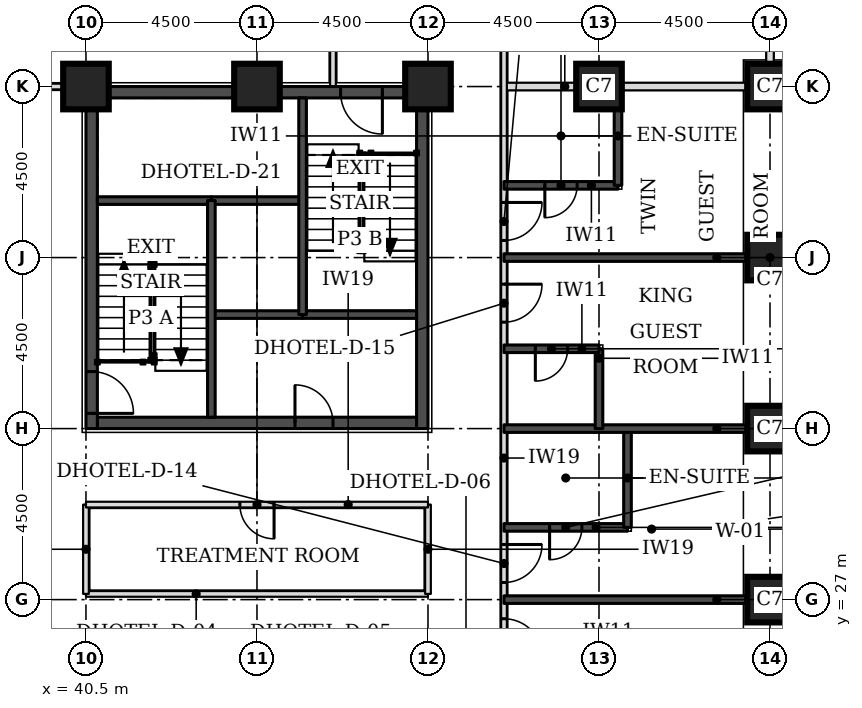
"""IFC4 building model, lengths in metres.
Left out: names, types, materials, properties, quantities, classifications, styles, units other than length and angle.
Written with IfcOpenShell. Run it as: python <this file> out.ifc"""

import sys

from ifc_helpers import new_model, si_unit, direction, frame, frame_2d, origin, origin_2d, place, context, subcontext, project, spatial, rectangle, extrude, element, fill, save


model = new_model("IFC4")
c1 = context("Model", 3, precision=1e-05, world=origin(), true_north=direction((0.0, 1.0)))
c2 = subcontext(c1, "Body", "Model", "MODEL_VIEW")
j1 = project(units=[si_unit("LENGTHUNIT", "METRE"), si_unit("PLANEANGLEUNIT", "RADIAN")], contexts=[c1])
p1 = place(None, origin())
s1 = spatial("IfcSite", under=j1, at=p1, CompositionType="ELEMENT")
p2 = place(p1, origin())
s2 = spatial("IfcBuilding", under=s1, at=p2, CompositionType="ELEMENT")
p3 = place(p2, frame((0.0, 0.0, 36.3)))
s3 = spatial("IfcBuildingStorey", under=s2, at=p3, CompositionType="ELEMENT", Elevation=36.3)
for number, where, z_axis, x_axis in (
    (1, (58.5, 27.0, 0.0), (0.0, 0.0, 1.0), (1.0, 0.0, 0.0)),
    (2, (58.5, 31.5, 0.0), (0.0, 0.0, 1.0), (1.0, 0.0, 0.0)),
    (3, (58.5, 36.0, 0.0), (0.0, 0.0, 1.0), (1.0, 0.0, 0.0)),
    (4, (40.5, 40.5, 0.0), (0.0, 0.0, 1.0), (1.0, 0.0, 0.0)),
    (5, (45.0, 40.5, 0.0), (0.0, 0.0, 1.0), (1.0, 0.0, 0.0)),
    (6, (49.5, 40.5, 0.0), (0.0, 0.0, 1.0), (1.0, 0.0, 0.0)),
    (7, (54.0, 40.5, 0.0), (0.0, 0.0, 1.0), (1.0, 0.0, 0.0)),
    (8, (58.5, 40.5, 0.0), (0.0, 0.0, 1.0), (1.0, 0.0, 0.0)),
):
    element("IfcColumn", number, at=place(p3, frame(where, z_axis=z_axis, x_axis=x_axis)), inside=s3, PredefinedType="COLUMN", context=c2, shape_type="SweptSolid", body=[
        extrude(rectangle(XDim=1.2, YDim=1.2, at=origin_2d()), origin(), (0.0, 0.0, 1.0), 3.3),
    ])
p4 = place(p3, frame((40.8, 31.65, 0.0), z_axis=(0.0, 0.0, 1.0), x_axis=(1.0, 0.0, 0.0)))
e9 = element("IfcWall", 9, at=p4, inside=s3, PredefinedType="SHEAR", context=c2, shape_type="SweptSolid", body=[
    extrude(rectangle(XDim=8.4, YDim=0.3, at=frame_2d((4.2, 0.0))), origin(), (0.0, 0.0, 1.0), 3.3),
])
p5 = place(p4, frame((5.2, 0.0, 0.0)))
e10 = element("IfcOpeningElement", 10, at=p5, cuts=e9, PredefinedType="OPENING", context=c2, shape_type="SweptSolid", body=[
    extrude(rectangle(XDim=1.0, YDim=2.1, at=frame_2d((0.5, 1.05))), frame((0.0, 0.16, 0.0), z_axis=(0.0, -1.0, 0.0), x_axis=(1.0, 0.0, 0.0)), (0.0, 0.0, 1.0), 0.32),
])
p6 = place(p3, frame((40.8, 40.35, 0.0), z_axis=(0.0, 0.0, 1.0), x_axis=(1.0, 0.0, 0.0)))
e11 = element("IfcWall", 11, at=p6, inside=s3, PredefinedType="SHEAR", context=c2, shape_type="SweptSolid", body=[
    extrude(rectangle(XDim=8.4, YDim=0.3, at=frame_2d((4.2, 0.0))), origin(), (0.0, 0.0, 1.0), 3.3),
])
p7 = place(p6, frame((6.4, 0.0, 0.0)))
e12 = element("IfcOpeningElement", 12, at=p7, cuts=e11, PredefinedType="OPENING", context=c2, shape_type="SweptSolid", body=[
    extrude(rectangle(XDim=1.1, YDim=2.1, at=frame_2d((0.55, 1.05))), frame((0.0, 0.16, 0.0), z_axis=(0.0, -1.0, 0.0), x_axis=(1.0, 0.0, 0.0)), (0.0, 0.0, 1.0), 0.32),
])
p8 = place(p3, frame((40.65, 31.5, 0.0), z_axis=(0.0, 0.0, 1.0), x_axis=(0.0, 1.0, 0.0)))
e13 = element("IfcWall", 13, at=p8, inside=s3, PredefinedType="SHEAR", context=c2, shape_type="SweptSolid", body=[
    extrude(rectangle(XDim=9.0, YDim=0.3, at=frame_2d((4.5, 0.0))), origin(), (0.0, 0.0, 1.0), 3.3),
])
p9 = place(p8, frame((0.4, 0.0, 0.0)))
e14 = element("IfcOpeningElement", 14, at=p9, cuts=e13, PredefinedType="OPENING", context=c2, shape_type="SweptSolid", body=[
    extrude(rectangle(XDim=1.1, YDim=2.1, at=frame_2d((0.55, 1.05))), frame((0.0, 0.16, 0.0), z_axis=(0.0, -1.0, 0.0), x_axis=(1.0, 0.0, 0.0)), (0.0, 0.0, 1.0), 0.32),
])
p10 = place(p3, frame((49.35, 31.5, 0.0), z_axis=(0.0, 0.0, 1.0), x_axis=(0.0, 1.0, 0.0)))
e15 = element("IfcWall", 15, at=p10, inside=s3, PredefinedType="SHEAR", context=c2, shape_type="SweptSolid", body=[
    extrude(rectangle(XDim=9.0, YDim=0.3, at=frame_2d((4.5, 0.0))), origin(), (0.0, 0.0, 1.0), 3.3),
])
p11 = place(p3, frame((51.5, 40.5, 0.0), z_axis=(0.0, 0.0, 1.0), x_axis=(1.0, 0.0, 0.0)))
e16 = element("IfcWall", 16, at=p11, inside=s3, PredefinedType="PARTITIONING", context=c2, shape_type="SweptSolid", body=[
    extrude(rectangle(XDim=6.4, YDim=0.2, at=frame_2d((3.2, 0.0))), origin(), (0.0, 0.0, 1.0), 2.33),
])
p12 = place(p3, frame((58.5, 41.1, 0.0), z_axis=(0.0, 0.0, 1.0), x_axis=(0.0, 1.0, 0.0)))
e17 = element("IfcWall", 17, at=p12, inside=s3, PredefinedType="PARTITIONING", context=c2, shape_type="SweptSolid", body=[
    extrude(rectangle(XDim=6.4, YDim=0.2, at=frame_2d((3.2, 0.0))), origin(), (0.0, 0.0, 1.0), 3.08),
])
p13 = place(p3, frame((51.5, 25.15, 0.0), z_axis=(0.0, 0.0, 1.0), x_axis=(0.0, 1.0, 0.0)))
e18 = element("IfcWall", 18, at=p13, inside=s3, PredefinedType="PARTITIONING", context=c2, shape_type="SweptSolid", body=[
    extrude(rectangle(XDim=22.35, YDim=0.15, at=frame_2d((11.175, 0.0))), origin(), (0.0, 0.0, 1.0), 3.08),
])
p14 = place(p13, frame((0.347, 0.0, 0.0)))
e19 = element("IfcOpeningElement", 19, at=p14, cuts=e18, PredefinedType="OPENING", context=c2, shape_type="SweptSolid", body=[
    extrude(rectangle(XDim=1.0, YDim=2.1, at=frame_2d((0.5, 1.05))), frame((0.0, 0.085, 0.0), z_axis=(0.0, -1.0, 0.0), x_axis=(1.0, 0.0, 0.0)), (0.0, 0.0, 1.0), 0.17),
])
p15 = place(p13, frame((2.3, 0.0, 0.0)))
e20 = element("IfcOpeningElement", 20, at=p15, cuts=e18, PredefinedType="OPENING", context=c2, shape_type="SweptSolid", body=[
    extrude(rectangle(XDim=1.0, YDim=2.1, at=frame_2d((0.5, 1.05))), frame((0.0, 0.085, 0.0), z_axis=(0.0, -1.0, 0.0), x_axis=(1.0, 0.0, 0.0)), (0.0, 0.0, 1.0), 0.17),
])
p16 = place(p13, frame((9.15, 0.0, 0.0)))
e21 = element("IfcOpeningElement", 21, at=p16, cuts=e18, PredefinedType="OPENING", context=c2, shape_type="SweptSolid", body=[
    extrude(rectangle(XDim=1.0, YDim=2.1, at=frame_2d((0.5, 1.05))), frame((0.0, 0.085, 0.0), z_axis=(0.0, -1.0, 0.0), x_axis=(1.0, 0.0, 0.0)), (0.0, 0.0, 1.0), 0.17),
])
p17 = place(p13, frame((11.3, 0.0, 0.0)))
e22 = element("IfcOpeningElement", 22, at=p17, cuts=e18, PredefinedType="OPENING", context=c2, shape_type="SweptSolid", body=[
    extrude(rectangle(XDim=1.0, YDim=2.1, at=frame_2d((0.5, 1.05))), frame((0.0, 0.085, 0.0), z_axis=(0.0, -1.0, 0.0), x_axis=(1.0, 0.0, 0.0)), (0.0, 0.0, 1.0), 0.17),
])
p18 = place(p13, frame((18.4, 0.0, 0.0)))
e23 = element("IfcOpeningElement", 23, at=p18, cuts=e18, PredefinedType="OPENING", context=c2, shape_type="SweptSolid", body=[
    extrude(rectangle(XDim=0.9, YDim=2.1, at=frame_2d((0.45, 1.05))), frame((0.0, 0.085, 0.0), z_axis=(0.0, -1.0, 0.0), x_axis=(1.0, 0.0, 0.0)), (0.0, 0.0, 1.0), 0.17),
])
p19 = place(p3, frame((40.5, 27.15, 0.0), z_axis=(0.0, 0.0, 1.0), x_axis=(1.0, 0.0, 0.0)))
e24 = element("IfcWall", 24, at=p19, inside=s3, PredefinedType="PARTITIONING", context=c2, shape_type="SweptSolid", body=[
    extrude(rectangle(XDim=9.0, YDim=0.15, at=frame_2d((4.5, 0.0))), origin(), (0.0, 0.0, 1.0), 3.08),
])
for number, where, z_axis, x_axis in (
    (25, (40.5, 27.15, 0.0), (0.0, 0.0, 1.0), (0.0, 1.0, 0.0)),
    (26, (49.5, 27.15, 0.0), (0.0, 0.0, 1.0), (0.0, 1.0, 0.0)),
):
    element("IfcWall", number, at=place(p3, frame(where, z_axis=z_axis, x_axis=x_axis)), inside=s3, PredefinedType="PARTITIONING", context=c2, shape_type="SweptSolid", body=[
        extrude(rectangle(XDim=2.35, YDim=0.15, at=frame_2d((1.175, 0.0))), origin(), (0.0, 0.0, 1.0), 3.08),
    ])
p20 = place(p3, frame((40.5, 29.5, 0.0), z_axis=(0.0, 0.0, 1.0), x_axis=(1.0, 0.0, 0.0)))
e27 = element("IfcWall", 27, at=p20, inside=s3, PredefinedType="PARTITIONING", context=c2, shape_type="SweptSolid", body=[
    extrude(rectangle(XDim=9.0, YDim=0.15, at=frame_2d((4.5, 0.0))), origin(), (0.0, 0.0, 1.0), 3.08),
])
p21 = place(p20, frame((4.05, 0.0, 0.0)))
e28 = element("IfcOpeningElement", 28, at=p21, cuts=e27, PredefinedType="OPENING", context=c2, shape_type="SweptSolid", body=[
    extrude(rectangle(XDim=0.9, YDim=2.1, at=frame_2d((0.45, 1.05))), frame((0.0, 0.085, 0.0), z_axis=(0.0, -1.0, 0.0), x_axis=(1.0, 0.0, 0.0)), (0.0, 0.0, 1.0), 0.17),
])
p22 = place(p3, frame((38.5, 40.5, 0.0), z_axis=(0.0, 0.0, 1.0), x_axis=(1.0, 0.0, 0.0)))
e29 = element("IfcWall", 29, at=p22, inside=s3, PredefinedType="PARTITIONING", context=c2, shape_type="SweptSolid", body=[
    extrude(rectangle(XDim=1.95, YDim=0.15, at=frame_2d((0.975, 0.0))), origin(), (0.0, 0.0, 1.0), 2.33),
])
p23 = place(p3, frame((47.0, 40.5, 0.0), z_axis=(0.0, 0.0, 1.0), x_axis=(0.0, 1.0, 0.0)))
e30 = element("IfcWall", 30, at=p23, inside=s3, PredefinedType="PARTITIONING", context=c2, shape_type="SweptSolid", body=[
    extrude(rectangle(XDim=7.0, YDim=0.15, at=frame_2d((3.5, 0.0))), origin(), (0.0, 0.0, 1.0), 3.08),
])
p24 = place(p23, frame((3.05, 0.0, 0.0)))
e31 = element("IfcOpeningElement", 31, at=p24, cuts=e30, PredefinedType="OPENING", context=c2, shape_type="SweptSolid", body=[
    extrude(rectangle(XDim=0.9, YDim=2.1, at=frame_2d((0.45, 1.05))), frame((0.0, 0.085, 0.0), z_axis=(0.0, -1.0, 0.0), x_axis=(1.0, 0.0, 0.0)), (0.0, 0.0, 1.0), 0.17),
])
p25 = place(p3, frame((51.5, 27.0, 0.0), z_axis=(0.0, 0.0, 1.0), x_axis=(1.0, 0.0, 0.0)))
e32 = element("IfcWall", 32, at=p25, inside=s3, PredefinedType="SOLIDWALL", context=c2, shape_type="SweptSolid", body=[
    extrude(rectangle(XDim=6.4, YDim=0.2, at=frame_2d((3.2, 0.0))), origin(), (0.0, 0.0, 1.0), 3.08),
])
p26 = place(p3, frame((51.5, 28.9, 0.0), z_axis=(0.0, 0.0, 1.0), x_axis=(1.0, 0.0, 0.0)))
e33 = element("IfcWall", 33, at=p26, inside=s3, PredefinedType="SOLIDWALL", context=c2, shape_type="SweptSolid", body=[
    extrude(rectangle(XDim=3.25, YDim=0.2, at=frame_2d((1.625, 0.0))), origin(), (0.0, 0.0, 1.0), 3.08),
])
p27 = place(p26, frame((1.2, 0.0, 0.0)))
e34 = element("IfcOpeningElement", 34, at=p27, cuts=e33, PredefinedType="OPENING", context=c2, shape_type="SweptSolid", body=[
    extrude(rectangle(XDim=0.85, YDim=2.1, at=frame_2d((0.425, 1.05))), frame((0.0, 0.11, 0.0), z_axis=(0.0, -1.0, 0.0), x_axis=(1.0, 0.0, 0.0)), (0.0, 0.0, 1.0), 0.22),
])
p28 = place(p3, frame((54.75, 28.9, 0.0), z_axis=(0.0, 0.0, 1.0), x_axis=(0.0, 1.0, 0.0)))
e35 = element("IfcWall", 35, at=p28, inside=s3, PredefinedType="SOLIDWALL", context=c2, shape_type="SweptSolid", body=[
    extrude(rectangle(XDim=2.6, YDim=0.2, at=frame_2d((1.3, 0.0))), origin(), (0.0, 0.0, 1.0), 3.08),
])
p29 = place(p3, frame((51.5, 31.5, 0.0), z_axis=(0.0, 0.0, 1.0), x_axis=(1.0, 0.0, 0.0)))
e36 = element("IfcWall", 36, at=p29, inside=s3, PredefinedType="SOLIDWALL", context=c2, shape_type="SweptSolid", body=[
    extrude(rectangle(XDim=6.4, YDim=0.2, at=frame_2d((3.2, 0.0))), origin(), (0.0, 0.0, 1.0), 3.08),
])
p30 = place(p3, frame((54.0, 31.5, 0.0), z_axis=(0.0, 0.0, 1.0), x_axis=(0.0, 1.0, 0.0)))
e37 = element("IfcWall", 37, at=p30, inside=s3, PredefinedType="SOLIDWALL", context=c2, shape_type="SweptSolid", body=[
    extrude(rectangle(XDim=2.1, YDim=0.2, at=frame_2d((1.05, 0.0))), origin(), (0.0, 0.0, 1.0), 3.08),
])
p31 = place(p3, frame((51.5, 33.6, 0.0), z_axis=(0.0, 0.0, 1.0), x_axis=(1.0, 0.0, 0.0)))
e38 = element("IfcWall", 38, at=p31, inside=s3, PredefinedType="SOLIDWALL", context=c2, shape_type="SweptSolid", body=[
    extrude(rectangle(XDim=2.5, YDim=0.2, at=frame_2d((1.25, 0.0))), origin(), (0.0, 0.0, 1.0), 3.08),
])
p32 = place(p31, frame((0.825, 0.0, 0.0)))
e39 = element("IfcOpeningElement", 39, at=p32, cuts=e38, PredefinedType="OPENING", context=c2, shape_type="SweptSolid", body=[
    extrude(rectangle(XDim=0.85, YDim=2.1, at=frame_2d((0.425, 1.05))), frame((0.0, 0.11, 0.0), z_axis=(0.0, -1.0, 0.0), x_axis=(1.0, 0.0, 0.0)), (0.0, 0.0, 1.0), 0.22),
])
p33 = place(p3, frame((51.5, 36.0, 0.0), z_axis=(0.0, 0.0, 1.0), x_axis=(1.0, 0.0, 0.0)))
e40 = element("IfcWall", 40, at=p33, inside=s3, PredefinedType="SOLIDWALL", context=c2, shape_type="SweptSolid", body=[
    extrude(rectangle(XDim=6.4, YDim=0.2, at=frame_2d((3.2, 0.0))), origin(), (0.0, 0.0, 1.0), 3.08),
])
p34 = place(p3, frame((51.5, 37.9, 0.0), z_axis=(0.0, 0.0, 1.0), x_axis=(1.0, 0.0, 0.0)))
e41 = element("IfcWall", 41, at=p34, inside=s3, PredefinedType="SOLIDWALL", context=c2, shape_type="SweptSolid", body=[
    extrude(rectangle(XDim=3.0, YDim=0.2, at=frame_2d((1.5, 0.0))), origin(), (0.0, 0.0, 1.0), 3.08),
])
p35 = place(p34, frame((1.075, 0.0, 0.0)))
e42 = element("IfcOpeningElement", 42, at=p35, cuts=e41, PredefinedType="OPENING", context=c2, shape_type="SweptSolid", body=[
    extrude(rectangle(XDim=0.85, YDim=2.1, at=frame_2d((0.425, 1.05))), frame((0.0, 0.11, 0.0), z_axis=(0.0, -1.0, 0.0), x_axis=(1.0, 0.0, 0.0)), (0.0, 0.0, 1.0), 0.22),
])
p36 = place(p3, frame((54.5, 37.9, 0.0), z_axis=(0.0, 0.0, 1.0), x_axis=(0.0, 1.0, 0.0)))
e43 = element("IfcWall", 43, at=p36, inside=s3, PredefinedType="SOLIDWALL", context=c2, shape_type="SweptSolid", body=[
    extrude(rectangle(XDim=2.6, YDim=0.2, at=frame_2d((1.3, 0.0))), origin(), (0.0, 0.0, 1.0), 3.08),
])
p37 = place(p3, frame((43.8, 34.5, 0.0), z_axis=(0.0, 0.0, 1.0), x_axis=(1.0, 0.0, 0.0)))
e44 = element("IfcWall", 44, at=p37, inside=s3, PredefinedType="SOLIDWALL", context=c2, shape_type="SweptSolid", body=[
    extrude(rectangle(XDim=2.4, YDim=0.2, at=frame_2d((1.2, 0.0))), origin(), (0.0, 0.0, 1.0), 3.08),
])
p38 = place(p3, frame((46.2, 34.5, 0.0), z_axis=(0.0, 0.0, 1.0), x_axis=(1.0, 0.0, 0.0)))
e45 = element("IfcWall", 45, at=p38, inside=s3, PredefinedType="SOLIDWALL", context=c2, shape_type="SweptSolid", body=[
    extrude(rectangle(XDim=3.0, YDim=0.2, at=frame_2d((1.5, 0.0))), origin(), (0.0, 0.0, 1.0), 3.08),
])
p39 = place(p3, frame((43.8, 37.5, 0.0), z_axis=(0.0, 0.0, 1.0), x_axis=(1.0, 0.0, 0.0)))
e46 = element("IfcWall", 46, at=p39, inside=s3, PredefinedType="SOLIDWALL", context=c2, shape_type="SweptSolid", body=[
    extrude(rectangle(XDim=2.4, YDim=0.2, at=frame_2d((1.2, 0.0))), origin(), (0.0, 0.0, 1.0), 3.3),
])
p40 = place(p3, frame((40.8, 37.5, 0.0), z_axis=(0.0, 0.0, 1.0), x_axis=(1.0, 0.0, 0.0)))
e47 = element("IfcWall", 47, at=p40, inside=s3, PredefinedType="SOLIDWALL", context=c2, shape_type="SweptSolid", body=[
    extrude(rectangle(XDim=3.0, YDim=0.2, at=frame_2d((1.5, 0.0))), origin(), (0.0, 0.0, 1.0), 3.08),
])
for number, where, z_axis, x_axis in (
    (48, (43.8, 31.8, 0.0), (0.0, 0.0, 1.0), (0.0, 1.0, 0.0)),
    (49, (46.2, 34.5, 0.0), (0.0, 0.0, 1.0), (0.0, 1.0, 0.0)),
):
    element("IfcWall", number, at=place(p3, frame(where, z_axis=z_axis, x_axis=x_axis)), inside=s3, PredefinedType="SOLIDWALL", context=c2, shape_type="SweptSolid", body=[
        extrude(rectangle(XDim=5.7, YDim=0.2, at=frame_2d((2.85, 0.0))), origin(), (0.0, 0.0, 1.0), 3.08),
    ])
p41 = place(p14, frame((1.0, 0.0, 0.0), z_axis=(0.0, 0.0, 1.0), x_axis=(-1.0, 0.0, 0.0)))
e50 = element("IfcDoor", 50, at=p41, inside=s3, OperationType="SINGLE_SWING_RIGHT", PredefinedType="DOOR", context=c2, shape_type="SweptSolid", body=[
    extrude(rectangle(XDim=1.0, YDim=2.1, at=frame_2d((0.5, 1.05))), frame((0.0, 0.025, 0.0), z_axis=(0.0, -1.0, 0.0), x_axis=(1.0, 0.0, 0.0)), (0.0, 0.0, 1.0), 0.05),
])
fill(e19, e50)
p42 = place(p15, frame((1.0, 0.0, 0.0), z_axis=(0.0, 0.0, 1.0), x_axis=(-1.0, 0.0, 0.0)))
e51 = element("IfcDoor", 51, at=p42, inside=s3, OperationType="SINGLE_SWING_LEFT", PredefinedType="DOOR", context=c2, shape_type="SweptSolid", body=[
    extrude(rectangle(XDim=1.0, YDim=2.1, at=frame_2d((0.5, 1.05))), frame((0.0, 0.025, 0.0), z_axis=(0.0, -1.0, 0.0), x_axis=(1.0, 0.0, 0.0)), (0.0, 0.0, 1.0), 0.05),
])
fill(e20, e51)
p43 = place(p27, frame((0.85, 0.0, 0.0), z_axis=(0.0, 0.0, 1.0), x_axis=(-1.0, 0.0, 0.0)))
e52 = element("IfcDoor", 52, at=p43, inside=s3, OperationType="SINGLE_SWING_RIGHT", PredefinedType="DOOR", context=c2, shape_type="SweptSolid", body=[
    extrude(rectangle(XDim=0.85, YDim=2.1, at=frame_2d((0.425, 1.05))), frame((0.0, 0.025, 0.0), z_axis=(0.0, -1.0, 0.0), x_axis=(1.0, 0.0, 0.0)), (0.0, 0.0, 1.0), 0.05),
])
fill(e34, e52)
p44 = place(p16, frame((1.0, 0.0, 0.0), z_axis=(0.0, 0.0, 1.0), x_axis=(-1.0, 0.0, 0.0)))
e53 = element("IfcDoor", 53, at=p44, inside=s3, OperationType="SINGLE_SWING_LEFT", PredefinedType="DOOR", context=c2, shape_type="SweptSolid", body=[
    extrude(rectangle(XDim=1.0, YDim=2.1, at=frame_2d((0.5, 1.05))), frame((0.0, 0.025, 0.0), z_axis=(0.0, -1.0, 0.0), x_axis=(1.0, 0.0, 0.0)), (0.0, 0.0, 1.0), 0.05),
])
fill(e21, e53)
p45 = place(p32, frame((0.85, 0.0, 0.0), z_axis=(0.0, 0.0, 1.0), x_axis=(-1.0, 0.0, 0.0)))
e54 = element("IfcDoor", 54, at=p45, inside=s3, OperationType="SINGLE_SWING_RIGHT", PredefinedType="DOOR", context=c2, shape_type="SweptSolid", body=[
    extrude(rectangle(XDim=0.85, YDim=2.1, at=frame_2d((0.425, 1.05))), frame((0.0, 0.025, 0.0), z_axis=(0.0, -1.0, 0.0), x_axis=(1.0, 0.0, 0.0)), (0.0, 0.0, 1.0), 0.05),
])
fill(e39, e54)
p46 = place(p17, frame((1.0, 0.0, 0.0), z_axis=(0.0, 0.0, 1.0), x_axis=(-1.0, 0.0, 0.0)))
e55 = element("IfcDoor", 55, at=p46, inside=s3, OperationType="SINGLE_SWING_LEFT", PredefinedType="DOOR", context=c2, shape_type="SweptSolid", body=[
    extrude(rectangle(XDim=1.0, YDim=2.1, at=frame_2d((0.5, 1.05))), frame((0.0, 0.025, 0.0), z_axis=(0.0, -1.0, 0.0), x_axis=(1.0, 0.0, 0.0)), (0.0, 0.0, 1.0), 0.05),
])
fill(e22, e55)
p47 = place(p35, frame((0.85, 0.0, 0.0), z_axis=(0.0, 0.0, 1.0), x_axis=(-1.0, 0.0, 0.0)))
e56 = element("IfcDoor", 56, at=p47, inside=s3, OperationType="SINGLE_SWING_RIGHT", PredefinedType="DOOR", context=c2, shape_type="SweptSolid", body=[
    extrude(rectangle(XDim=0.85, YDim=2.1, at=frame_2d((0.425, 1.05))), frame((0.0, 0.025, 0.0), z_axis=(0.0, -1.0, 0.0), x_axis=(1.0, 0.0, 0.0)), (0.0, 0.0, 1.0), 0.05),
])
fill(e42, e56)
p48 = place(p21, frame((0.9, 0.0, 0.0), z_axis=(0.0, 0.0, 1.0), x_axis=(-1.0, 0.0, 0.0)))
e57 = element("IfcDoor", 57, at=p48, inside=s3, OperationType="SINGLE_SWING_LEFT", PredefinedType="DOOR", context=c2, shape_type="SweptSolid", body=[
    extrude(rectangle(XDim=0.9, YDim=2.1, at=frame_2d((0.45, 1.05))), frame((0.0, 0.025, 0.0), z_axis=(0.0, -1.0, 0.0), x_axis=(1.0, 0.0, 0.0)), (0.0, 0.0, 1.0), 0.05),
])
fill(e28, e57)
p49 = place(p9, frame((1.1, 0.0, 0.0), z_axis=(0.0, 0.0, 1.0), x_axis=(-1.0, 0.0, 0.0)))
e58 = element("IfcDoor", 58, at=p49, inside=s3, OperationType="SINGLE_SWING_RIGHT", PredefinedType="DOOR", context=c2, shape_type="SweptSolid", body=[
    extrude(rectangle(XDim=1.1, YDim=2.1, at=frame_2d((0.55, 1.05))), frame((0.0, 0.025, 0.0), z_axis=(0.0, -1.0, 0.0), x_axis=(1.0, 0.0, 0.0)), (0.0, 0.0, 1.0), 0.05),
])
fill(e14, e58)
p50 = place(p7, frame((1.1, 0.0, 0.0), z_axis=(0.0, 0.0, 1.0), x_axis=(-1.0, 0.0, 0.0)))
e59 = element("IfcDoor", 59, at=p50, inside=s3, OperationType="SINGLE_SWING_LEFT", PredefinedType="DOOR", context=c2, shape_type="SweptSolid", body=[
    extrude(rectangle(XDim=1.1, YDim=2.1, at=frame_2d((0.55, 1.05))), frame((0.0, 0.025, 0.0), z_axis=(0.0, -1.0, 0.0), x_axis=(1.0, 0.0, 0.0)), (0.0, 0.0, 1.0), 0.05),
])
fill(e12, e59)
p51 = place(p5, origin())
e60 = element("IfcDoor", 60, at=p51, inside=s3, OperationType="SINGLE_SWING_LEFT", PredefinedType="DOOR", context=c2, shape_type="SweptSolid", body=[
    extrude(rectangle(XDim=1.0, YDim=2.1, at=frame_2d((0.5, 1.05))), frame((0.0, 0.025, 0.0), z_axis=(0.0, -1.0, 0.0), x_axis=(1.0, 0.0, 0.0)), (0.0, 0.0, 1.0), 0.05),
])
fill(e10, e60)
save(model, sys.argv[1])
